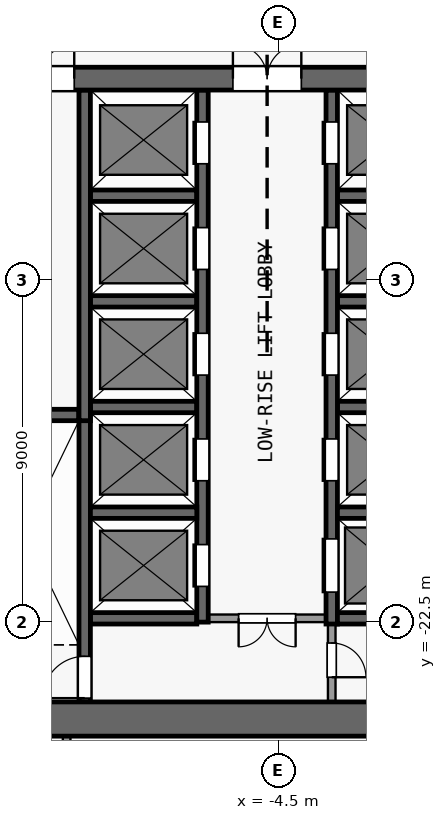
"""IFC4 building model, lengths in metres.
Left out: names, types, materials, properties, quantities, classifications, styles, units other than length and angle.
Written with IfcOpenShell. Run it as: python <this file> out.ifc"""

import sys

from ifc_helpers import new_model, si_unit, direction, frame, frame_2d, origin, place, context, subcontext, project, spatial, rectangle, extrude, element, fill, save


model = new_model("IFC4")
c1 = context("Model", 3, precision=1e-05, world=origin(), true_north=direction((0.0, 1.0)))
c2 = subcontext(c1, "Body", "Model", "MODEL_VIEW")
j1 = project(units=[si_unit("LENGTHUNIT", "METRE"), si_unit("PLANEANGLEUNIT", "RADIAN")], contexts=[c1])
p1 = place(None, origin())
s1 = spatial("IfcSite", under=j1, at=p1, CompositionType="ELEMENT")
p2 = place(p1, origin())
s2 = spatial("IfcBuilding", under=s1, at=p2, CompositionType="ELEMENT")
p3 = place(p2, origin())
s3 = spatial("IfcBuildingStorey", under=s2, at=p3, CompositionType="ELEMENT", Elevation=0.0)
p4 = place(p3, frame((13.5, -25.05, 0.0), z_axis=(0.0, 0.0, 1.0), x_axis=(-1.0, 0.0, 0.0)))
e1 = element("IfcWall", 1, at=p4, inside=s3, PredefinedType="SHEAR", context=c2, shape_type="SweptSolid", body=[
    extrude(rectangle(XDim=27.0, YDim=0.9, at=frame_2d((13.5, 0.0))), origin(), (0.0, 0.0, 1.0), 7.65),
])
p5 = place(p4, frame((24.075, 0.0, 0.0)))
e2 = element("IfcOpeningElement", 2, at=p5, cuts=e1, PredefinedType="OPENING", context=c2, shape_type="SweptSolid", body=[
    extrude(rectangle(XDim=1.2, YDim=2.1, at=frame_2d((0.6, 1.05))), frame((0.0, 0.46, 0.0), z_axis=(0.0, -1.0, 0.0), x_axis=(1.0, 0.0, 0.0)), (0.0, 0.0, 1.0), 0.92),
])
p6 = place(p4, frame((1.725, 0.0, 0.0)))
e3 = element("IfcOpeningElement", 3, at=p6, cuts=e1, PredefinedType="OPENING", context=c2, shape_type="SweptSolid", body=[
    extrude(rectangle(XDim=1.2, YDim=2.1, at=frame_2d((0.6, 1.05))), frame((0.0, 0.46, 0.0), z_axis=(0.0, -1.0, 0.0), x_axis=(1.0, 0.0, 0.0)), (0.0, 0.0, 1.0), 0.92),
])
p7 = place(p3, frame((-13.5, -8.2, 0.0), z_axis=(0.0, 0.0, 1.0), x_axis=(1.0, 0.0, 0.0)))
e4 = element("IfcWall", 4, at=p7, inside=s3, PredefinedType="SHEAR", context=c2, shape_type="SweptSolid", body=[
    extrude(rectangle(XDim=27.0, YDim=0.6, at=frame_2d((13.5, 0.0))), origin(), (0.0, 0.0, 1.0), 7.65),
])
p8 = place(p7, frame((7.8, 0.0, 0.0)))
e5 = element("IfcOpeningElement", 5, at=p8, cuts=e4, PredefinedType="OPENING", context=c2, shape_type="SweptSolid", body=[
    extrude(rectangle(XDim=1.8, YDim=2.1, at=frame_2d((0.9, 1.05))), frame((0.0, 0.31, 0.0), z_axis=(0.0, -1.0, 0.0), x_axis=(1.0, 0.0, 0.0)), (0.0, 0.0, 1.0), 0.62),
])
p9 = place(p7, frame((17.4, 0.0, 0.0)))
e6 = element("IfcOpeningElement", 6, at=p9, cuts=e4, PredefinedType="OPENING", context=c2, shape_type="SweptSolid", body=[
    extrude(rectangle(XDim=1.8, YDim=2.1, at=frame_2d((0.9, 1.05))), frame((0.0, 0.31, 0.0), z_axis=(0.0, -1.0, 0.0), x_axis=(1.0, 0.0, 0.0)), (0.0, 0.0, 1.0), 0.62),
])
p10 = place(p7, frame((2.725, 0.0, 0.0)))
e7 = element("IfcOpeningElement", 7, at=p10, cuts=e4, PredefinedType="OPENING", context=c2, shape_type="SweptSolid", body=[
    extrude(rectangle(XDim=0.9, YDim=2.1, at=frame_2d((0.45, 1.05))), frame((0.0, 0.31, 0.0), z_axis=(0.0, -1.0, 0.0), x_axis=(1.0, 0.0, 0.0)), (0.0, 0.0, 1.0), 0.62),
])
p11 = place(p7, frame((24.075, 0.0, 0.0)))
e8 = element("IfcOpeningElement", 8, at=p11, cuts=e4, PredefinedType="OPENING", context=c2, shape_type="SweptSolid", body=[
    extrude(rectangle(XDim=1.2, YDim=2.1, at=frame_2d((0.6, 1.05))), frame((0.0, 0.31, 0.0), z_axis=(0.0, -1.0, 0.0), x_axis=(1.0, 0.0, 0.0)), (0.0, 0.0, 1.0), 0.62),
])
p12 = place(p3, frame((-9.45, -22.4, 0.0), z_axis=(0.0, 0.0, 1.0), x_axis=(1.0, 0.0, 0.0)))
e9 = element("IfcWall", 9, at=p12, inside=s3, PredefinedType="SHEAR", context=c2, shape_type="SweptSolid", body=[
    extrude(rectangle(XDim=2.8, YDim=0.3, at=frame_2d((1.4, 0.0))), origin(), (0.0, 0.0, 1.0), 7.65),
])
p13 = place(p3, frame((-3.25, -22.4, 0.0), z_axis=(0.0, 0.0, 1.0), x_axis=(-1.0, 0.0, 0.0)))
e10 = element("IfcWall", 10, at=p13, inside=s3, PredefinedType="PARTITIONING", context=c2, shape_type="SweptSolid", body=[
    extrude(rectangle(XDim=3.1, YDim=0.2, at=frame_2d((1.55, 0.0))), origin(), (0.0, 0.0, 1.0), 7.65),
])
p14 = place(p13, frame((0.8, 0.0, 0.0)))
e11 = element("IfcOpeningElement", 11, at=p14, cuts=e10, PredefinedType="OPENING", context=c2, shape_type="SweptSolid", body=[
    extrude(rectangle(XDim=1.5, YDim=2.1, at=frame_2d((0.75, 1.05))), frame((0.0, 0.11, 0.0), z_axis=(0.0, -1.0, 0.0), x_axis=(1.0, 0.0, 0.0)), (0.0, 0.0, 1.0), 0.22),
])
p15 = place(p3, frame((-2.95, -22.4, 0.0), z_axis=(0.0, 0.0, 1.0), x_axis=(1.0, 0.0, 0.0)))
e12 = element("IfcWall", 12, at=p15, inside=s3, PredefinedType="SHEAR", context=c2, shape_type="SweptSolid", body=[
    extrude(rectangle(XDim=6.2, YDim=0.3, at=frame_2d((3.1, 0.0))), origin(), (0.0, 0.0, 1.0), 7.65),
])
for number, where, z_axis, x_axis in (
    (13, (-9.45, -19.62, 0.0), (0.0, 0.0, 1.0), (1.0, 0.0, 0.0)),
    (14, (-2.95, -19.62, 0.0), (0.0, 0.0, 1.0), (1.0, 0.0, 0.0)),
):
    element("IfcWall", number, at=place(p3, frame(where, z_axis=z_axis, x_axis=x_axis)), inside=s3, PredefinedType="SHEAR", context=c2, shape_type="SweptSolid", body=[
        extrude(rectangle(XDim=2.8, YDim=0.3, at=frame_2d((1.4, 0.0))), origin(), (0.0, 0.0, 1.0), 7.65),
    ])
p16 = place(p3, frame((-12.6, -17.05, 0.0), z_axis=(0.0, 0.0, 1.0), x_axis=(1.0, 0.0, 0.0)))
e15 = element("IfcWall", 15, at=p16, inside=s3, PredefinedType="SHEAR", context=c2, shape_type="SweptSolid", body=[
    extrude(rectangle(XDim=2.85, YDim=0.3, at=frame_2d((1.425, 0.0))), origin(), (0.0, 0.0, 1.0), 7.65),
])
for number, where, z_axis, x_axis in (
    (16, (-9.45, -16.84, 0.0), (0.0, 0.0, 1.0), (1.0, 0.0, 0.0)),
    (17, (-2.95, -16.84, 0.0), (0.0, 0.0, 1.0), (1.0, 0.0, 0.0)),
    (18, (-9.45, -14.06, 0.0), (0.0, 0.0, 1.0), (1.0, 0.0, 0.0)),
    (19, (-2.95, -14.06, 0.0), (0.0, 0.0, 1.0), (1.0, 0.0, 0.0)),
    (20, (-9.45, -11.28, 0.0), (0.0, 0.0, 1.0), (1.0, 0.0, 0.0)),
    (21, (-2.95, -11.28, 0.0), (0.0, 0.0, 1.0), (1.0, 0.0, 0.0)),
):
    element("IfcWall", number, at=place(p3, frame(where, z_axis=z_axis, x_axis=x_axis)), inside=s3, PredefinedType="SHEAR", context=c2, shape_type="SweptSolid", body=[
        extrude(rectangle(XDim=2.8, YDim=0.3, at=frame_2d((1.4, 0.0))), origin(), (0.0, 0.0, 1.0), 7.65),
    ])
p17 = place(p3, frame((-9.6, -24.6, 0.0), z_axis=(0.0, 0.0, 1.0), x_axis=(0.0, 1.0, 0.0)))
e22 = element("IfcWall", 22, at=p17, inside=s3, PredefinedType="SHEAR", context=c2, shape_type="SweptSolid", body=[
    extrude(rectangle(XDim=7.7, YDim=0.3, at=frame_2d((3.85, 0.0))), origin(), (0.0, 0.0, 1.0), 7.65),
])
p18 = place(p17, frame((0.1, 0.0, 0.0)))
e23 = element("IfcOpeningElement", 23, at=p18, cuts=e22, PredefinedType="OPENING", context=c2, shape_type="SweptSolid", body=[
    extrude(rectangle(XDim=1.1, YDim=2.1, at=frame_2d((0.55, 1.05))), frame((0.0, 0.16, 0.0), z_axis=(0.0, -1.0, 0.0), x_axis=(1.0, 0.0, 0.0)), (0.0, 0.0, 1.0), 0.32),
])
p19 = place(p3, frame((-9.6, -17.2, 0.0), z_axis=(0.0, 0.0, 1.0), x_axis=(0.0, 1.0, 0.0)))
e24 = element("IfcWall", 24, at=p19, inside=s3, PredefinedType="SHEAR", context=c2, shape_type="SweptSolid", body=[
    extrude(rectangle(XDim=8.7, YDim=0.3, at=frame_2d((4.35, 0.0))), origin(), (0.0, 0.0, 1.0), 7.65),
])
p20 = place(p3, frame((-6.5, -22.5, 0.0), z_axis=(0.0, 0.0, 1.0), x_axis=(0.0, 1.0, 0.0)))
e25 = element("IfcWall", 25, at=p20, inside=s3, PredefinedType="SHEAR", context=c2, shape_type="SweptSolid", body=[
    extrude(rectangle(XDim=14.0, YDim=0.3, at=frame_2d((7.0, 0.0))), origin(), (0.0, 0.0, 1.0), 7.65),
])
p21 = place(p20, frame((0.94, 0.0, 0.0)))
e26 = element("IfcOpeningElement", 26, at=p21, cuts=e25, PredefinedType="OPENING", context=c2, shape_type="SweptSolid", body=[
    extrude(rectangle(XDim=1.1, YDim=2.1, at=frame_2d((0.55, 1.05))), frame((0.0, 0.16, 0.0), z_axis=(0.0, -1.0, 0.0), x_axis=(1.0, 0.0, 0.0)), (0.0, 0.0, 1.0), 0.32),
])
p22 = place(p20, frame((3.72, 0.0, 0.0)))
e27 = element("IfcOpeningElement", 27, at=p22, cuts=e25, PredefinedType="OPENING", context=c2, shape_type="SweptSolid", body=[
    extrude(rectangle(XDim=1.1, YDim=2.1, at=frame_2d((0.55, 1.05))), frame((0.0, 0.16, 0.0), z_axis=(0.0, -1.0, 0.0), x_axis=(1.0, 0.0, 0.0)), (0.0, 0.0, 1.0), 0.32),
])
p23 = place(p20, frame((6.5, 0.0, 0.0)))
e28 = element("IfcOpeningElement", 28, at=p23, cuts=e25, PredefinedType="OPENING", context=c2, shape_type="SweptSolid", body=[
    extrude(rectangle(XDim=1.1, YDim=2.1, at=frame_2d((0.55, 1.05))), frame((0.0, 0.16, 0.0), z_axis=(0.0, -1.0, 0.0), x_axis=(1.0, 0.0, 0.0)), (0.0, 0.0, 1.0), 0.32),
])
p24 = place(p20, frame((9.28, 0.0, 0.0)))
e29 = element("IfcOpeningElement", 29, at=p24, cuts=e25, PredefinedType="OPENING", context=c2, shape_type="SweptSolid", body=[
    extrude(rectangle(XDim=1.1, YDim=2.1, at=frame_2d((0.55, 1.05))), frame((0.0, 0.16, 0.0), z_axis=(0.0, -1.0, 0.0), x_axis=(1.0, 0.0, 0.0)), (0.0, 0.0, 1.0), 0.32),
])
p25 = place(p20, frame((12.06, 0.0, 0.0)))
e30 = element("IfcOpeningElement", 30, at=p25, cuts=e25, PredefinedType="OPENING", context=c2, shape_type="SweptSolid", body=[
    extrude(rectangle(XDim=1.1, YDim=2.1, at=frame_2d((0.55, 1.05))), frame((0.0, 0.16, 0.0), z_axis=(0.0, -1.0, 0.0), x_axis=(1.0, 0.0, 0.0)), (0.0, 0.0, 1.0), 0.32),
])
p26 = place(p3, frame((-3.1, -22.55, 0.0), z_axis=(0.0, 0.0, 1.0), x_axis=(0.0, -1.0, 0.0)))
e31 = element("IfcWall", 31, at=p26, inside=s3, PredefinedType="PARTITIONING", context=c2, shape_type="SweptSolid", body=[
    extrude(rectangle(XDim=2.05, YDim=0.2, at=frame_2d((1.025, 0.0))), origin(), (0.0, 0.0, 1.0), 7.65),
])
p27 = place(p26, frame((0.5, 0.0, 0.0)))
e32 = element("IfcOpeningElement", 32, at=p27, cuts=e31, PredefinedType="OPENING", context=c2, shape_type="SweptSolid", body=[
    extrude(rectangle(XDim=0.9, YDim=2.1, at=frame_2d((0.45, 1.05))), frame((0.0, 0.11, 0.0), z_axis=(0.0, -1.0, 0.0), x_axis=(1.0, 0.0, 0.0)), (0.0, 0.0, 1.0), 0.22),
])
p28 = place(p3, frame((-3.1, -22.55, 0.0), z_axis=(0.0, 0.0, 1.0), x_axis=(0.0, 1.0, 0.0)))
e33 = element("IfcWall", 33, at=p28, inside=s3, PredefinedType="SHEAR", context=c2, shape_type="SweptSolid", body=[
    extrude(rectangle(XDim=14.05, YDim=0.3, at=frame_2d((7.025, 0.0))), origin(), (0.0, 0.0, 1.0), 7.65),
])
p29 = place(p28, frame((12.11, 0.0, 0.0)))
e34 = element("IfcOpeningElement", 34, at=p29, cuts=e33, PredefinedType="OPENING", context=c2, shape_type="SweptSolid", body=[
    extrude(rectangle(XDim=1.1, YDim=2.1, at=frame_2d((0.55, 1.05))), frame((0.0, 0.16, 0.0), z_axis=(0.0, -1.0, 0.0), x_axis=(1.0, 0.0, 0.0)), (0.0, 0.0, 1.0), 0.32),
])
p30 = place(p28, frame((3.77, 0.0, 0.0)))
e35 = element("IfcOpeningElement", 35, at=p30, cuts=e33, PredefinedType="OPENING", context=c2, shape_type="SweptSolid", body=[
    extrude(rectangle(XDim=1.1, YDim=2.1, at=frame_2d((0.55, 1.05))), frame((0.0, 0.16, 0.0), z_axis=(0.0, -1.0, 0.0), x_axis=(1.0, 0.0, 0.0)), (0.0, 0.0, 1.0), 0.32),
])
p31 = place(p28, frame((6.55, 0.0, 0.0)))
e36 = element("IfcOpeningElement", 36, at=p31, cuts=e33, PredefinedType="OPENING", context=c2, shape_type="SweptSolid", body=[
    extrude(rectangle(XDim=1.1, YDim=2.1, at=frame_2d((0.55, 1.05))), frame((0.0, 0.16, 0.0), z_axis=(0.0, -1.0, 0.0), x_axis=(1.0, 0.0, 0.0)), (0.0, 0.0, 1.0), 0.32),
])
p32 = place(p28, frame((9.33, 0.0, 0.0)))
e37 = element("IfcOpeningElement", 37, at=p32, cuts=e33, PredefinedType="OPENING", context=c2, shape_type="SweptSolid", body=[
    extrude(rectangle(XDim=1.1, YDim=2.1, at=frame_2d((0.55, 1.05))), frame((0.0, 0.16, 0.0), z_axis=(0.0, -1.0, 0.0), x_axis=(1.0, 0.0, 0.0)), (0.0, 0.0, 1.0), 0.32),
])
p33 = place(p28, frame((0.84, 0.0, 0.0)))
e38 = element("IfcOpeningElement", 38, at=p33, cuts=e33, PredefinedType="OPENING", context=c2, shape_type="SweptSolid", body=[
    extrude(rectangle(XDim=1.4, YDim=2.1, at=frame_2d((0.7, 1.05))), frame((0.0, 0.16, 0.0), z_axis=(0.0, -1.0, 0.0), x_axis=(1.0, 0.0, 0.0)), (0.0, 0.0, 1.0), 0.32),
])
p34 = place(p3, frame((-10.075, -34.35, 0.0), z_axis=(0.0, 0.0, 1.0), x_axis=(0.0, 1.0, 0.0)))
e39 = element("IfcWall", 39, at=p34, inside=s3, PredefinedType="PARTITIONING", context=c2, shape_type="SweptSolid", body=[
    extrude(rectangle(XDim=8.85, YDim=0.2, at=frame_2d((4.425, 0.0))), origin(), (0.0, 0.0, 1.0), 7.65),
])
p35 = place(p34, frame((0.85, 0.0, 0.0)))
e40 = element("IfcOpeningElement", 40, at=p35, cuts=e39, PredefinedType="OPENING", context=c2, shape_type="SweptSolid", body=[
    extrude(rectangle(XDim=1.0, YDim=2.1, at=frame_2d((0.5, 1.05))), frame((0.0, 0.11, 0.0), z_axis=(0.0, -1.0, 0.0), x_axis=(1.0, 0.0, 0.0)), (0.0, 0.0, 1.0), 0.22),
])
p36 = place(p21, origin())
e41 = element("IfcDoor", 41, at=p36, inside=s3, OperationType="DOUBLE_DOOR_SLIDING", PredefinedType="DOOR", context=c2, shape_type="SweptSolid", body=[
    extrude(rectangle(XDim=1.1, YDim=2.1, at=frame_2d((0.55, 1.05))), frame((0.0, 0.025, 0.0), z_axis=(0.0, -1.0, 0.0), x_axis=(1.0, 0.0, 0.0)), (0.0, 0.0, 1.0), 0.05),
])
fill(e26, e41)
p37 = place(p22, origin())
e42 = element("IfcDoor", 42, at=p37, inside=s3, OperationType="DOUBLE_DOOR_SLIDING", PredefinedType="DOOR", context=c2, shape_type="SweptSolid", body=[
    extrude(rectangle(XDim=1.1, YDim=2.1, at=frame_2d((0.55, 1.05))), frame((0.0, 0.025, 0.0), z_axis=(0.0, -1.0, 0.0), x_axis=(1.0, 0.0, 0.0)), (0.0, 0.0, 1.0), 0.05),
])
fill(e27, e42)
p38 = place(p23, origin())
e43 = element("IfcDoor", 43, at=p38, inside=s3, OperationType="DOUBLE_DOOR_SLIDING", PredefinedType="DOOR", context=c2, shape_type="SweptSolid", body=[
    extrude(rectangle(XDim=1.1, YDim=2.1, at=frame_2d((0.55, 1.05))), frame((0.0, 0.025, 0.0), z_axis=(0.0, -1.0, 0.0), x_axis=(1.0, 0.0, 0.0)), (0.0, 0.0, 1.0), 0.05),
])
fill(e28, e43)
p39 = place(p24, origin())
e44 = element("IfcDoor", 44, at=p39, inside=s3, OperationType="DOUBLE_DOOR_SLIDING", PredefinedType="DOOR", context=c2, shape_type="SweptSolid", body=[
    extrude(rectangle(XDim=1.1, YDim=2.1, at=frame_2d((0.55, 1.05))), frame((0.0, 0.025, 0.0), z_axis=(0.0, -1.0, 0.0), x_axis=(1.0, 0.0, 0.0)), (0.0, 0.0, 1.0), 0.05),
])
fill(e29, e44)
p40 = place(p25, origin())
e45 = element("IfcDoor", 45, at=p40, inside=s3, OperationType="DOUBLE_DOOR_SLIDING", PredefinedType="DOOR", context=c2, shape_type="SweptSolid", body=[
    extrude(rectangle(XDim=1.1, YDim=2.1, at=frame_2d((0.55, 1.05))), frame((0.0, 0.025, 0.0), z_axis=(0.0, -1.0, 0.0), x_axis=(1.0, 0.0, 0.0)), (0.0, 0.0, 1.0), 0.05),
])
fill(e30, e45)
p41 = place(p29, origin())
e46 = element("IfcDoor", 46, at=p41, inside=s3, OperationType="DOUBLE_DOOR_SLIDING", PredefinedType="DOOR", context=c2, shape_type="SweptSolid", body=[
    extrude(rectangle(XDim=1.1, YDim=2.1, at=frame_2d((0.55, 1.05))), frame((0.0, 0.025, 0.0), z_axis=(0.0, -1.0, 0.0), x_axis=(1.0, 0.0, 0.0)), (0.0, 0.0, 1.0), 0.05),
])
fill(e34, e46)
p42 = place(p30, origin())
e47 = element("IfcDoor", 47, at=p42, inside=s3, OperationType="DOUBLE_DOOR_SLIDING", PredefinedType="DOOR", context=c2, shape_type="SweptSolid", body=[
    extrude(rectangle(XDim=1.1, YDim=2.1, at=frame_2d((0.55, 1.05))), frame((0.0, 0.025, 0.0), z_axis=(0.0, -1.0, 0.0), x_axis=(1.0, 0.0, 0.0)), (0.0, 0.0, 1.0), 0.05),
])
fill(e35, e47)
p43 = place(p31, origin())
e48 = element("IfcDoor", 48, at=p43, inside=s3, OperationType="DOUBLE_DOOR_SLIDING", PredefinedType="DOOR", context=c2, shape_type="SweptSolid", body=[
    extrude(rectangle(XDim=1.1, YDim=2.1, at=frame_2d((0.55, 1.05))), frame((0.0, 0.025, 0.0), z_axis=(0.0, -1.0, 0.0), x_axis=(1.0, 0.0, 0.0)), (0.0, 0.0, 1.0), 0.05),
])
fill(e36, e48)
p44 = place(p32, origin())
e49 = element("IfcDoor", 49, at=p44, inside=s3, OperationType="DOUBLE_DOOR_SLIDING", PredefinedType="DOOR", context=c2, shape_type="SweptSolid", body=[
    extrude(rectangle(XDim=1.1, YDim=2.1, at=frame_2d((0.55, 1.05))), frame((0.0, 0.025, 0.0), z_axis=(0.0, -1.0, 0.0), x_axis=(1.0, 0.0, 0.0)), (0.0, 0.0, 1.0), 0.05),
])
fill(e37, e49)
p45 = place(p33, origin())
e50 = element("IfcDoor", 50, at=p45, inside=s3, OperationType="DOUBLE_DOOR_SLIDING", PredefinedType="DOOR", context=c2, shape_type="SweptSolid", body=[
    extrude(rectangle(XDim=1.4, YDim=2.1, at=frame_2d((0.7, 1.05))), frame((0.0, 0.025, 0.0), z_axis=(0.0, -1.0, 0.0), x_axis=(1.0, 0.0, 0.0)), (0.0, 0.0, 1.0), 0.05),
])
fill(e38, e50)
p46 = place(p14, origin())
e51 = element("IfcDoor", 51, at=p46, inside=s3, OperationType="DOUBLE_DOOR_SINGLE_SWING", PredefinedType="DOOR", context=c2, shape_type="SweptSolid", body=[
    extrude(rectangle(XDim=1.5, YDim=2.1, at=frame_2d((0.75, 1.05))), frame((0.0, 0.025, 0.0), z_axis=(0.0, -1.0, 0.0), x_axis=(1.0, 0.0, 0.0)), (0.0, 0.0, 1.0), 0.05),
])
fill(e11, e51)
p47 = place(p8, origin())
e52 = element("IfcDoor", 52, at=p47, inside=s3, OperationType="DOUBLE_DOOR_SINGLE_SWING", PredefinedType="DOOR", context=c2, shape_type="SweptSolid", body=[
    extrude(rectangle(XDim=1.8, YDim=2.1, at=frame_2d((0.9, 1.05))), frame((0.0, 0.025, 0.0), z_axis=(0.0, -1.0, 0.0), x_axis=(1.0, 0.0, 0.0)), (0.0, 0.0, 1.0), 0.05),
])
fill(e5, e52)
p48 = place(p10, origin())
e53 = element("IfcDoor", 53, at=p48, inside=s3, OperationType="SINGLE_SWING_RIGHT", PredefinedType="DOOR", context=c2, shape_type="SweptSolid", body=[
    extrude(rectangle(XDim=0.9, YDim=2.1, at=frame_2d((0.45, 1.05))), frame((0.0, 0.025, 0.0), z_axis=(0.0, -1.0, 0.0), x_axis=(1.0, 0.0, 0.0)), (0.0, 0.0, 1.0), 0.05),
])
fill(e7, e53)
p49 = place(p27, origin())
e54 = element("IfcDoor", 54, at=p49, inside=s3, OperationType="SINGLE_SWING_RIGHT", PredefinedType="DOOR", context=c2, shape_type="SweptSolid", body=[
    extrude(rectangle(XDim=0.9, YDim=2.1, at=frame_2d((0.45, 1.05))), frame((0.0, 0.025, 0.0), z_axis=(0.0, -1.0, 0.0), x_axis=(1.0, 0.0, 0.0)), (0.0, 0.0, 1.0), 0.05),
])
fill(e32, e54)
p50 = place(p18, origin())
e55 = element("IfcDoor", 55, at=p50, inside=s3, OperationType="SINGLE_SWING_LEFT", PredefinedType="DOOR", context=c2, shape_type="SweptSolid", body=[
    extrude(rectangle(XDim=1.1, YDim=2.1, at=frame_2d((0.55, 1.05))), frame((0.0, 0.025, 0.0), z_axis=(0.0, -1.0, 0.0), x_axis=(1.0, 0.0, 0.0)), (0.0, 0.0, 1.0), 0.05),
])
fill(e23, e55)
save(model, sys.argv[1])
